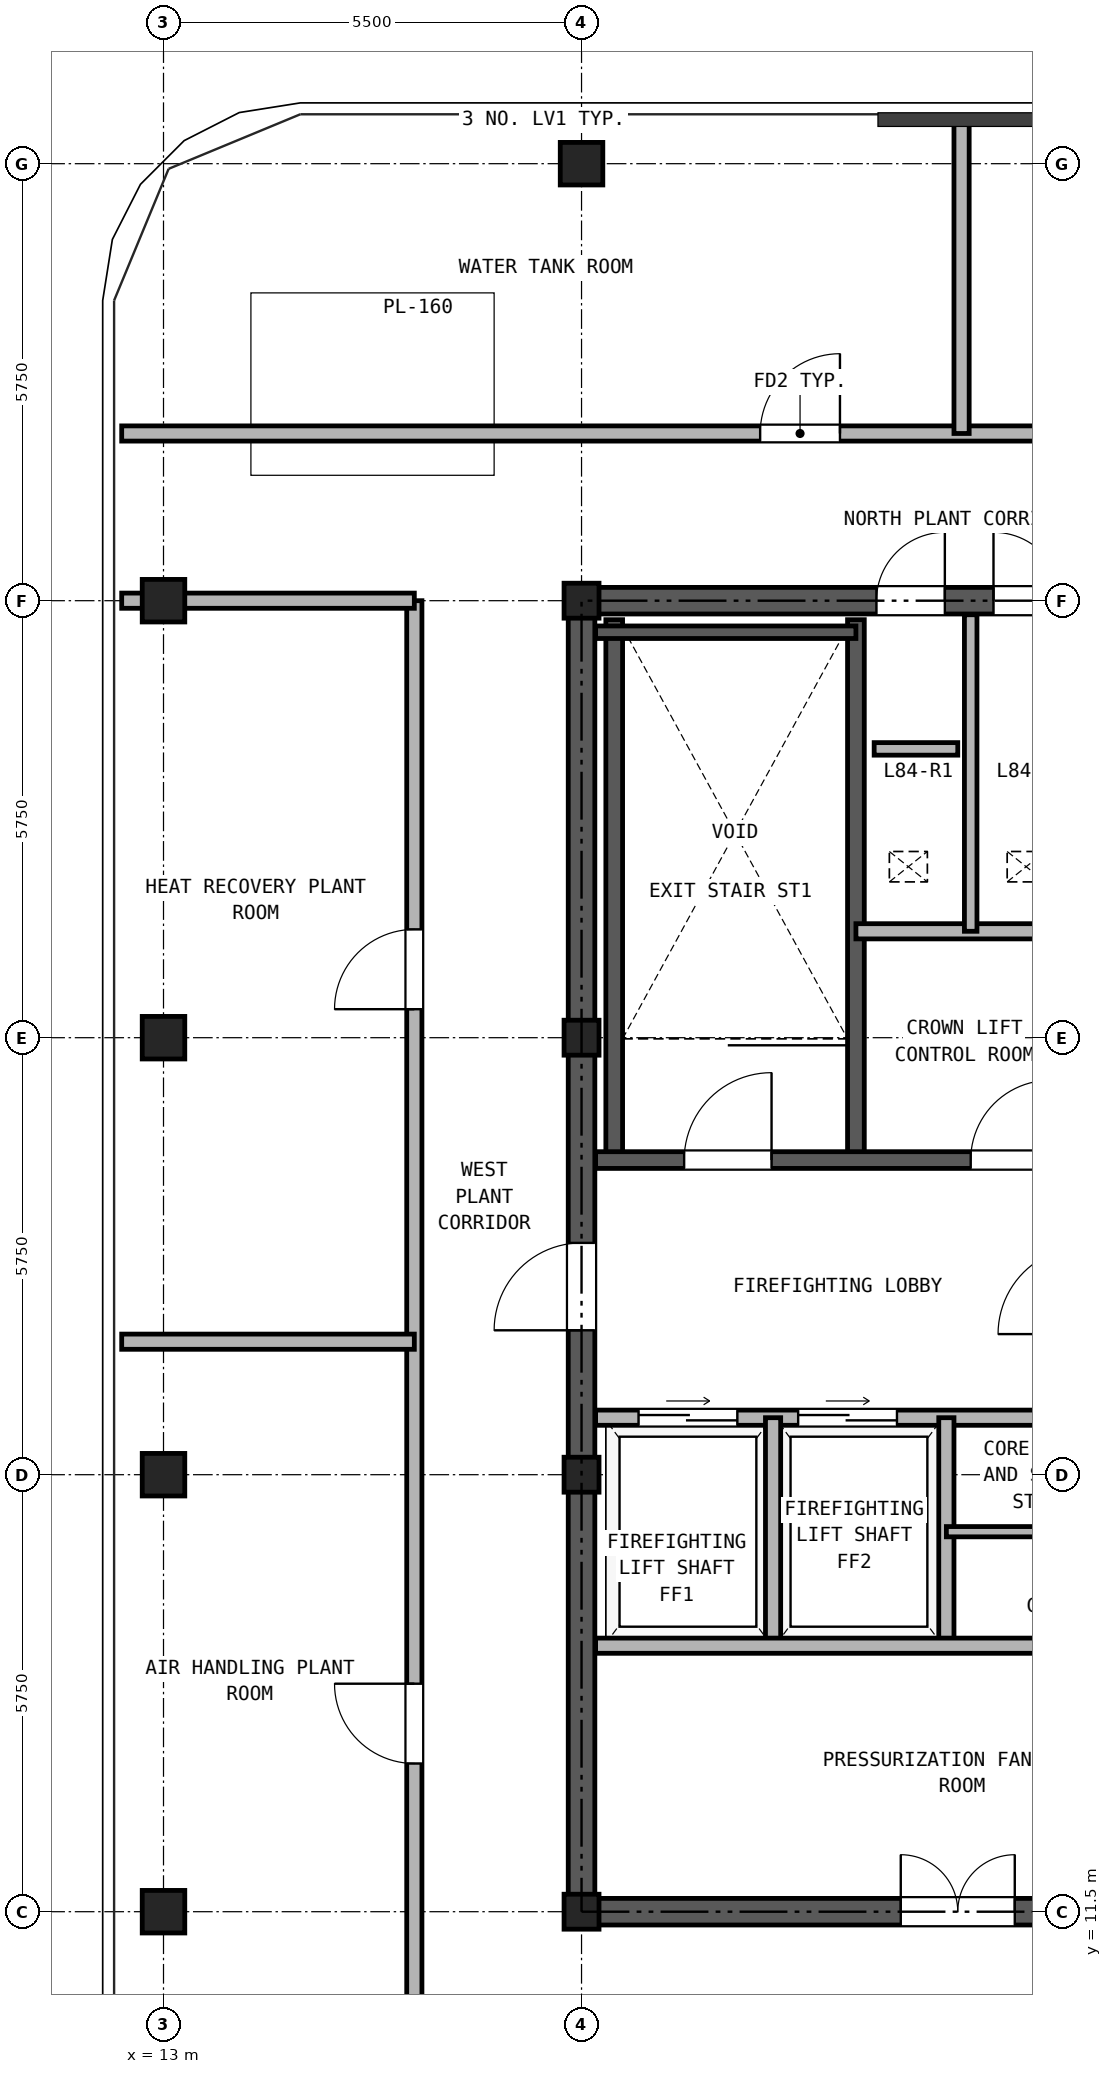
"""IFC4 building model, lengths in metres.
Left out: names, types, materials, properties, quantities, classifications, styles, units other than length and angle.
Written with IfcOpenShell. Run it as: python <this file> out.ifc"""

import sys

from ifc_helpers import new_model, si_unit, direction, frame, frame_2d, origin, origin_2d, place, context, subcontext, project, spatial, rectangle, hollow_rectangle, extrude, source, transform, mapped, element, fill, save


model = new_model("IFC4")
c1 = context("Model", 3, precision=1e-05, world=origin(), true_north=direction((0.0, 1.0)))
c2 = subcontext(c1, "Body", "Model", "MODEL_VIEW")
j1 = project(units=[si_unit("LENGTHUNIT", "METRE"), si_unit("PLANEANGLEUNIT", "RADIAN")], contexts=[c1])
p1 = place(None, origin())
s1 = spatial("IfcSite", under=j1, at=p1, CompositionType="ELEMENT")
p2 = place(p1, origin())
s2 = spatial("IfcBuilding", under=s1, at=p2, CompositionType="ELEMENT")
p3 = place(p2, frame((0.0, 0.0, 292.9)))
s3 = spatial("IfcBuildingStorey", under=s2, at=p3, CompositionType="ELEMENT", Elevation=292.9)
m1 = source(origin(), c2, "Body", "SweptSolid", [
    extrude(hollow_rectangle(XDim=0.56, YDim=0.56, WallThickness=0.03, at=origin_2d()), origin(), (0.0, 0.0, 1.0), 3.312),
])
for number, where, z_axis, x_axis in (
    (1, (18.5, 34.5, 0.0), (0.0, 0.0, 1.0), (1.0, 0.0, 0.0)),
    (2, (13.0, 11.5, 0.0), (0.0, 0.0, 1.0), (1.0, 0.0, 0.0)),
    (3, (13.0, 17.25, 0.0), (0.0, 0.0, 1.0), (1.0, 0.0, 0.0)),
    (4, (13.0, 23.0, 0.0), (0.0, 0.0, 1.0), (1.0, 0.0, 0.0)),
    (5, (13.0, 28.75, 0.0), (0.0, 0.0, 1.0), (1.0, 0.0, 0.0)),
):
    element("IfcColumn", number, at=place(p3, frame(where, z_axis=z_axis, x_axis=x_axis)), inside=s3, PredefinedType="COLUMN", context=c2, shape_type="MappedRepresentation", body=[
        mapped(m1, transform((0.0, 0.0, 0.0), x_axis=(1.0, 0.0, 0.0), y_axis=(0.0, 1.0, 0.0), z_axis=(0.0, 0.0, 1.0), scale=1.0)),
    ])
m2 = source(origin(), c2, "Body", "SweptSolid", [
    extrude(hollow_rectangle(XDim=0.46, YDim=0.46, WallThickness=0.025, at=origin_2d()), origin(), (0.0, 0.0, 1.0), 3.312),
])
for number, where, z_axis, x_axis in (
    (6, (18.5, 11.5, 0.0), (0.0, 0.0, 1.0), (1.0, 0.0, 0.0)),
    (7, (18.5, 17.25, 0.0), (0.0, 0.0, 1.0), (1.0, 0.0, 0.0)),
    (8, (18.5, 23.0, 0.0), (0.0, 0.0, 1.0), (1.0, 0.0, 0.0)),
    (9, (18.5, 28.75, 0.0), (0.0, 0.0, 1.0), (1.0, 0.0, 0.0)),
):
    element("IfcColumn", number, at=place(p3, frame(where, z_axis=z_axis, x_axis=x_axis)), inside=s3, PredefinedType="COLUMN", context=c2, shape_type="MappedRepresentation", body=[
        mapped(m2, transform((0.0, 0.0, 0.0), x_axis=(1.0, 0.0, 0.0), y_axis=(0.0, 1.0, 0.0), z_axis=(0.0, 0.0, 1.0), scale=1.0)),
    ])
p4 = place(p3, frame((18.325, 11.5, 0.0), z_axis=(0.0, 0.0, 1.0), x_axis=(1.0, 0.0, 0.0)))
e10 = element("IfcWall", 10, at=p4, inside=s3, PredefinedType="SHEAR", context=c2, shape_type="SweptSolid", body=[
    extrude(rectangle(XDim=10.35, YDim=0.35, at=frame_2d((5.175, 0.0))), origin(), (0.0, 0.0, 1.0), 3.34),
])
p5 = place(p4, frame((4.375, 0.0, 0.0)))
e11 = element("IfcOpeningElement", 11, at=p5, cuts=e10, PredefinedType="OPENING", context=c2, shape_type="SweptSolid", body=[
    extrude(rectangle(XDim=1.5, YDim=2.25, at=frame_2d((0.75, 1.125))), frame((0.0, 0.185, 0.0), z_axis=(0.0, -1.0, 0.0), x_axis=(1.0, 0.0, 0.0)), (0.0, 0.0, 1.0), 0.37),
])
p6 = place(p3, frame((18.325, 28.75, 0.0), z_axis=(0.0, 0.0, 1.0), x_axis=(1.0, 0.0, 0.0)))
e12 = element("IfcWall", 12, at=p6, inside=s3, PredefinedType="SHEAR", context=c2, shape_type="SweptSolid", body=[
    extrude(rectangle(XDim=10.35, YDim=0.35, at=frame_2d((5.175, 0.0))), origin(), (0.0, 0.0, 1.0), 3.34),
])
p7 = place(p6, frame((4.055, 0.0, 0.0)))
e13 = element("IfcOpeningElement", 13, at=p7, cuts=e12, PredefinedType="OPENING", context=c2, shape_type="SweptSolid", body=[
    extrude(rectangle(XDim=0.9, YDim=2.05, at=frame_2d((0.45, 1.025))), frame((0.0, 0.185, 0.0), z_axis=(0.0, -1.0, 0.0), x_axis=(1.0, 0.0, 0.0)), (0.0, 0.0, 1.0), 0.37),
])
p8 = place(p6, frame((5.595, 0.0, 0.0)))
e14 = element("IfcOpeningElement", 14, at=p8, cuts=e12, PredefinedType="OPENING", context=c2, shape_type="SweptSolid", body=[
    extrude(rectangle(XDim=0.9, YDim=2.05, at=frame_2d((0.45, 1.025))), frame((0.0, 0.185, 0.0), z_axis=(0.0, -1.0, 0.0), x_axis=(1.0, 0.0, 0.0)), (0.0, 0.0, 1.0), 0.37),
])
p9 = place(p3, frame((18.5, 11.675, 0.0), z_axis=(0.0, 0.0, 1.0), x_axis=(0.0, 1.0, 0.0)))
e15 = element("IfcWall", 15, at=p9, inside=s3, PredefinedType="SHEAR", context=c2, shape_type="SweptSolid", body=[
    extrude(rectangle(XDim=16.9, YDim=0.35, at=frame_2d((8.45, 0.0))), origin(), (0.0, 0.0, 1.0), 3.34),
])
p10 = place(p9, frame((7.475, 0.0, 0.0)))
e16 = element("IfcOpeningElement", 16, at=p10, cuts=e15, PredefinedType="OPENING", context=c2, shape_type="SweptSolid", body=[
    extrude(rectangle(XDim=1.15, YDim=2.2, at=frame_2d((0.575, 1.1))), frame((0.0, 0.185, 0.0), z_axis=(0.0, -1.0, 0.0), x_axis=(1.0, 0.0, 0.0)), (0.0, 0.0, 1.0), 0.37),
])
for number, where, z_axis, x_axis in (
    (17, (18.93, 21.39, 0.0), (0.0, 0.0, 1.0), (0.0, 1.0, 0.0)),
    (18, (22.11, 21.39, 0.0), (0.0, 0.0, 1.0), (0.0, 1.0, 0.0)),
):
    element("IfcWall", number, at=place(p3, frame(where, z_axis=z_axis, x_axis=x_axis)), inside=s3, PredefinedType="SOLIDWALL", context=c2, shape_type="SweptSolid", body=[
        extrude(rectangle(XDim=7.11, YDim=0.22, at=frame_2d((3.555, 0.0))), origin(), (0.0, 0.0, 1.0), 3.34),
    ])
p11 = place(p3, frame((18.685, 28.335, 0.0), z_axis=(0.0, 0.0, 1.0), x_axis=(1.0, 0.0, 0.0)))
e19 = element("IfcWall", 19, at=p11, inside=s3, PredefinedType="PARTITIONING", context=c2, shape_type="SweptSolid", body=[
    extrude(rectangle(XDim=3.425, YDim=0.165, at=frame_2d((1.712, 0.0))), origin(), (0.0, 0.0, 1.0), 3.34),
])
p12 = place(p3, frame((18.685, 21.39, 0.0), z_axis=(0.0, 0.0, 1.0), x_axis=(1.0, 0.0, 0.0)))
e20 = element("IfcWall", 20, at=p12, inside=s3, PredefinedType="SOLIDWALL", context=c2, shape_type="SweptSolid", body=[
    extrude(rectangle(XDim=6.445, YDim=0.22, at=frame_2d((3.222, 0.0))), origin(), (0.0, 0.0, 1.0), 3.34),
])
p13 = place(p12, frame((1.165, 0.0, 0.0)))
e21 = element("IfcOpeningElement", 21, at=p13, cuts=e20, PredefinedType="OPENING", context=c2, shape_type="SweptSolid", body=[
    extrude(rectangle(XDim=1.15, YDim=2.2, at=frame_2d((0.575, 1.1))), frame((0.0, 0.12, 0.0), z_axis=(0.0, -1.0, 0.0), x_axis=(1.0, 0.0, 0.0)), (0.0, 0.0, 1.0), 0.24),
])
p14 = place(p12, frame((4.935, 0.0, 0.0)))
e22 = element("IfcOpeningElement", 22, at=p14, cuts=e20, PredefinedType="OPENING", context=c2, shape_type="SweptSolid", body=[
    extrude(rectangle(XDim=1.05, YDim=2.15, at=frame_2d((0.525, 1.075))), frame((0.0, 0.12, 0.0), z_axis=(0.0, -1.0, 0.0), x_axis=(1.0, 0.0, 0.0)), (0.0, 0.0, 1.0), 0.24),
])
p15 = place(p3, frame((22.11, 24.4, 0.0), z_axis=(0.0, 0.0, 1.0), x_axis=(1.0, 0.0, 0.0)))
e23 = element("IfcWall", 23, at=p15, inside=s3, PredefinedType="PARTITIONING", context=c2, shape_type="SweptSolid", body=[
    extrude(rectangle(XDim=3.02, YDim=0.2, at=frame_2d((1.51, 0.0))), origin(), (0.0, 0.0, 1.0), 3.34),
])
p16 = place(p3, frame((23.62, 24.4, 0.0), z_axis=(0.0, 0.0, 1.0), x_axis=(0.0, 1.0, 0.0)))
e24 = element("IfcWall", 24, at=p16, inside=s3, PredefinedType="PARTITIONING", context=c2, shape_type="SweptSolid", body=[
    extrude(rectangle(XDim=4.165, YDim=0.165, at=frame_2d((2.083, 0.0))), origin(), (0.0, 0.0, 1.0), 3.34),
])
p17 = place(p3, frame((18.685, 18.0, 0.0), z_axis=(0.0, 0.0, 1.0), x_axis=(1.0, 0.0, 0.0)))
e25 = element("IfcWall", 25, at=p17, inside=s3, PredefinedType="PARTITIONING", context=c2, shape_type="SweptSolid", body=[
    extrude(rectangle(XDim=9.63, YDim=0.2, at=frame_2d((4.815, 0.0))), origin(), (0.0, 0.0, 1.0), 3.34),
])
p18 = place(p17, frame((0.565, 0.0, 0.0)))
e26 = element("IfcOpeningElement", 26, at=p18, cuts=e25, PredefinedType="OPENING", context=c2, shape_type="SweptSolid", body=[
    extrude(rectangle(XDim=1.3, YDim=2.3, at=frame_2d((0.65, 1.15))), frame((0.0, 0.11, 0.0), z_axis=(0.0, -1.0, 0.0), x_axis=(1.0, 0.0, 0.0)), (0.0, 0.0, 1.0), 0.22),
])
p19 = place(p17, frame((2.665, 0.0, 0.0)))
e27 = element("IfcOpeningElement", 27, at=p19, cuts=e25, PredefinedType="OPENING", context=c2, shape_type="SweptSolid", body=[
    extrude(rectangle(XDim=1.3, YDim=2.3, at=frame_2d((0.65, 1.15))), frame((0.0, 0.11, 0.0), z_axis=(0.0, -1.0, 0.0), x_axis=(1.0, 0.0, 0.0)), (0.0, 0.0, 1.0), 0.22),
])
p20 = place(p17, frame((7.165, 0.0, 0.0)))
e28 = element("IfcOpeningElement", 28, at=p20, cuts=e25, PredefinedType="OPENING", context=c2, shape_type="SweptSolid", body=[
    extrude(rectangle(XDim=1.0, YDim=2.15, at=frame_2d((0.5, 1.075))), frame((0.0, 0.11, 0.0), z_axis=(0.0, -1.0, 0.0), x_axis=(1.0, 0.0, 0.0)), (0.0, 0.0, 1.0), 0.22),
])
for number, where, z_axis, x_axis in (
    (29, (21.02, 15.0, 0.0), (0.0, 0.0, 1.0), (0.0, 1.0, 0.0)),
    (30, (23.3, 15.0, 0.0), (0.0, 0.0, 1.0), (0.0, 1.0, 0.0)),
):
    element("IfcWall", number, at=place(p3, frame(where, z_axis=z_axis, x_axis=x_axis)), inside=s3, PredefinedType="PARTITIONING", context=c2, shape_type="SweptSolid", body=[
        extrude(rectangle(XDim=3.0, YDim=0.2, at=frame_2d((1.5, 0.0))), origin(), (0.0, 0.0, 1.0), 3.34),
    ])
p21 = place(p3, frame((18.685, 15.0, 0.0), z_axis=(0.0, 0.0, 1.0), x_axis=(1.0, 0.0, 0.0)))
e31 = element("IfcWall", 31, at=p21, inside=s3, PredefinedType="PARTITIONING", context=c2, shape_type="SweptSolid", body=[
    extrude(rectangle(XDim=9.63, YDim=0.2, at=frame_2d((4.815, 0.0))), origin(), (0.0, 0.0, 1.0), 3.34),
])
p22 = place(p3, frame((23.3, 16.5, 0.0), z_axis=(0.0, 0.0, 1.0), x_axis=(1.0, 0.0, 0.0)))
e32 = element("IfcWall", 32, at=p22, inside=s3, PredefinedType="PARTITIONING", context=c2, shape_type="SweptSolid", body=[
    extrude(rectangle(XDim=5.015, YDim=0.135, at=frame_2d((2.507, 0.0))), origin(), (0.0, 0.0, 1.0), 3.34),
])
p23 = place(p22, frame((2.55, 0.0, 0.0)))
e33 = element("IfcOpeningElement", 33, at=p23, cuts=e32, PredefinedType="OPENING", context=c2, shape_type="SweptSolid", body=[
    extrude(rectangle(XDim=0.9, YDim=2.05, at=frame_2d((0.45, 1.025))), frame((0.0, 0.077, 0.0), z_axis=(0.0, -1.0, 0.0), x_axis=(1.0, 0.0, 0.0)), (0.0, 0.0, 1.0), 0.155),
])
p24 = place(p3, frame((12.45, 30.95, 0.0), z_axis=(0.0, 0.0, 1.0), x_axis=(1.0, 0.0, 0.0)))
e34 = element("IfcWall", 34, at=p24, inside=s3, PredefinedType="PARTITIONING", context=c2, shape_type="SweptSolid", body=[
    extrude(rectangle(XDim=22.1, YDim=0.2, at=frame_2d((11.05, 0.0))), origin(), (0.0, 0.0, 1.0), 3.34),
])
p25 = place(p24, frame((8.4, 0.0, 0.0)))
e35 = element("IfcOpeningElement", 35, at=p25, cuts=e34, PredefinedType="OPENING", context=c2, shape_type="SweptSolid", body=[
    extrude(rectangle(XDim=1.05, YDim=2.15, at=frame_2d((0.525, 1.075))), frame((0.0, 0.11, 0.0), z_axis=(0.0, -1.0, 0.0), x_axis=(1.0, 0.0, 0.0)), (0.0, 0.0, 1.0), 0.22),
])
p26 = place(p24, frame((12.7, 0.0, 0.0)))
e36 = element("IfcOpeningElement", 36, at=p26, cuts=e34, PredefinedType="OPENING", context=c2, shape_type="SweptSolid", body=[
    extrude(rectangle(XDim=1.05, YDim=2.15, at=frame_2d((0.525, 1.075))), frame((0.0, 0.11, 0.0), z_axis=(0.0, -1.0, 0.0), x_axis=(1.0, 0.0, 0.0)), (0.0, 0.0, 1.0), 0.22),
])
p27 = place(p3, frame((16.3, 8.9, 0.0), z_axis=(0.0, 0.0, 1.0), x_axis=(0.0, 1.0, 0.0)))
e37 = element("IfcWall", 37, at=p27, inside=s3, PredefinedType="PARTITIONING", context=c2, shape_type="SweptSolid", body=[
    extrude(rectangle(XDim=19.85, YDim=0.2, at=frame_2d((9.925, 0.0))), origin(), (0.0, 0.0, 1.0), 3.34),
])
p28 = place(p27, frame((4.55, 0.0, 0.0)))
e38 = element("IfcOpeningElement", 38, at=p28, cuts=e37, PredefinedType="OPENING", context=c2, shape_type="SweptSolid", body=[
    extrude(rectangle(XDim=1.05, YDim=2.15, at=frame_2d((0.525, 1.075))), frame((0.0, 0.11, 0.0), z_axis=(0.0, -1.0, 0.0), x_axis=(1.0, 0.0, 0.0)), (0.0, 0.0, 1.0), 0.22),
])
p29 = place(p27, frame((14.475, 0.0, 0.0)))
e39 = element("IfcOpeningElement", 39, at=p29, cuts=e37, PredefinedType="OPENING", context=c2, shape_type="SweptSolid", body=[
    extrude(rectangle(XDim=1.05, YDim=2.15, at=frame_2d((0.525, 1.075))), frame((0.0, 0.11, 0.0), z_axis=(0.0, -1.0, 0.0), x_axis=(1.0, 0.0, 0.0)), (0.0, 0.0, 1.0), 0.22),
])
p30 = place(p3, frame((12.45, 28.75, 0.0), z_axis=(0.0, 0.0, 1.0), x_axis=(1.0, 0.0, 0.0)))
e40 = element("IfcWall", 40, at=p30, inside=s3, PredefinedType="PARTITIONING", context=c2, shape_type="SweptSolid", body=[
    extrude(rectangle(XDim=3.85, YDim=0.2, at=frame_2d((1.925, 0.0))), origin(), (0.0, 0.0, 1.0), 2.865),
])
p31 = place(p3, frame((23.5, 30.95, 0.0), z_axis=(0.0, 0.0, 1.0), x_axis=(0.0, 1.0, 0.0)))
e41 = element("IfcWall", 41, at=p31, inside=s3, PredefinedType="PARTITIONING", context=c2, shape_type="SweptSolid", body=[
    extrude(rectangle(XDim=4.1, YDim=0.2, at=frame_2d((2.05, 0.0))), origin(), (0.0, 0.0, 1.0), 3.34),
])
p32 = place(p3, frame((12.45, 19.0, 0.0), z_axis=(0.0, 0.0, 1.0), x_axis=(1.0, 0.0, 0.0)))
e42 = element("IfcWall", 42, at=p32, inside=s3, PredefinedType="PARTITIONING", context=c2, shape_type="SweptSolid", body=[
    extrude(rectangle(XDim=3.85, YDim=0.2, at=frame_2d((1.925, 0.0))), origin(), (0.0, 0.0, 1.0), 3.34),
])
p33 = place(p3, frame((22.35, 26.8, 0.0), z_axis=(0.0, 0.0, 1.0), x_axis=(1.0, 0.0, 0.0)))
e43 = element("IfcWall", 43, at=p33, inside=s3, PredefinedType="PARTITIONING", context=c2, shape_type="SweptSolid", body=[
    extrude(rectangle(XDim=1.1, YDim=0.165, at=frame_2d((0.55, 0.0))), origin(), (0.0, 0.0, 1.0), 3.34),
])
p34 = place(p13, frame((1.15, 0.0, 0.0), z_axis=(0.0, 0.0, 1.0), x_axis=(-1.0, 0.0, 0.0)))
e44 = element("IfcDoor", 44, at=p34, inside=s3, OperationType="SINGLE_SWING_RIGHT", PredefinedType="DOOR", context=c2, shape_type="SweptSolid", body=[
    extrude(rectangle(XDim=1.15, YDim=2.2, at=frame_2d((0.575, 1.1))), frame((0.0, 0.025, 0.0), z_axis=(0.0, -1.0, 0.0), x_axis=(1.0, 0.0, 0.0)), (0.0, 0.0, 1.0), 0.05),
])
fill(e21, e44)
p35 = place(p14, origin())
e45 = element("IfcDoor", 45, at=p35, inside=s3, OperationType="SINGLE_SWING_RIGHT", PredefinedType="DOOR", context=c2, shape_type="SweptSolid", body=[
    extrude(rectangle(XDim=1.05, YDim=2.15, at=frame_2d((0.525, 1.075))), frame((0.0, 0.025, 0.0), z_axis=(0.0, -1.0, 0.0), x_axis=(1.0, 0.0, 0.0)), (0.0, 0.0, 1.0), 0.05),
])
fill(e22, e45)
p36 = place(p18, origin())
e46 = element("IfcDoor", 46, at=p36, inside=s3, OperationType="DOUBLE_DOOR_SLIDING", PredefinedType="DOOR", context=c2, shape_type="SweptSolid", body=[
    extrude(rectangle(XDim=1.3, YDim=2.3, at=frame_2d((0.65, 1.15))), frame((0.0, 0.025, 0.0), z_axis=(0.0, -1.0, 0.0), x_axis=(1.0, 0.0, 0.0)), (0.0, 0.0, 1.0), 0.05),
])
fill(e26, e46)
p37 = place(p19, origin())
e47 = element("IfcDoor", 47, at=p37, inside=s3, OperationType="DOUBLE_DOOR_SLIDING", PredefinedType="DOOR", context=c2, shape_type="SweptSolid", body=[
    extrude(rectangle(XDim=1.3, YDim=2.3, at=frame_2d((0.65, 1.15))), frame((0.0, 0.025, 0.0), z_axis=(0.0, -1.0, 0.0), x_axis=(1.0, 0.0, 0.0)), (0.0, 0.0, 1.0), 0.05),
])
fill(e27, e47)
p38 = place(p10, frame((1.15, 0.0, 0.0), z_axis=(0.0, 0.0, 1.0), x_axis=(-1.0, 0.0, 0.0)))
e48 = element("IfcDoor", 48, at=p38, inside=s3, OperationType="SINGLE_SWING_LEFT", PredefinedType="DOOR", context=c2, shape_type="SweptSolid", body=[
    extrude(rectangle(XDim=1.15, YDim=2.2, at=frame_2d((0.575, 1.1))), frame((0.0, 0.025, 0.0), z_axis=(0.0, -1.0, 0.0), x_axis=(1.0, 0.0, 0.0)), (0.0, 0.0, 1.0), 0.05),
])
fill(e16, e48)
p39 = place(p7, origin())
e49 = element("IfcDoor", 49, at=p39, inside=s3, OperationType="SINGLE_SWING_RIGHT", PredefinedType="DOOR", context=c2, shape_type="SweptSolid", body=[
    extrude(rectangle(XDim=0.9, YDim=2.05, at=frame_2d((0.45, 1.025))), frame((0.0, 0.025, 0.0), z_axis=(0.0, -1.0, 0.0), x_axis=(1.0, 0.0, 0.0)), (0.0, 0.0, 1.0), 0.05),
])
fill(e13, e49)
p40 = place(p8, origin())
e50 = element("IfcDoor", 50, at=p40, inside=s3, OperationType="SINGLE_SWING_LEFT", PredefinedType="DOOR", context=c2, shape_type="SweptSolid", body=[
    extrude(rectangle(XDim=0.9, YDim=2.05, at=frame_2d((0.45, 1.025))), frame((0.0, 0.025, 0.0), z_axis=(0.0, -1.0, 0.0), x_axis=(1.0, 0.0, 0.0)), (0.0, 0.0, 1.0), 0.05),
])
fill(e14, e50)
p41 = place(p5, frame((1.5, 0.0, 0.0), z_axis=(0.0, 0.0, 1.0), x_axis=(-1.0, 0.0, 0.0)))
e51 = element("IfcDoor", 51, at=p41, inside=s3, OperationType="DOUBLE_DOOR_SINGLE_SWING", PredefinedType="DOOR", context=c2, shape_type="SweptSolid", body=[
    extrude(rectangle(XDim=1.5, YDim=2.25, at=frame_2d((0.75, 1.125))), frame((0.0, 0.025, 0.0), z_axis=(0.0, -1.0, 0.0), x_axis=(1.0, 0.0, 0.0)), (0.0, 0.0, 1.0), 0.05),
])
fill(e11, e51)
p42 = place(p25, origin())
e52 = element("IfcDoor", 52, at=p42, inside=s3, OperationType="SINGLE_SWING_RIGHT", PredefinedType="DOOR", context=c2, shape_type="SweptSolid", body=[
    extrude(rectangle(XDim=1.05, YDim=2.15, at=frame_2d((0.525, 1.075))), frame((0.0, 0.025, 0.0), z_axis=(0.0, -1.0, 0.0), x_axis=(1.0, 0.0, 0.0)), (0.0, 0.0, 1.0), 0.05),
])
fill(e35, e52)
p43 = place(p28, frame((1.05, 0.0, 0.0), z_axis=(0.0, 0.0, 1.0), x_axis=(-1.0, 0.0, 0.0)))
e53 = element("IfcDoor", 53, at=p43, inside=s3, OperationType="SINGLE_SWING_RIGHT", PredefinedType="DOOR", context=c2, shape_type="SweptSolid", body=[
    extrude(rectangle(XDim=1.05, YDim=2.15, at=frame_2d((0.525, 1.075))), frame((0.0, 0.025, 0.0), z_axis=(0.0, -1.0, 0.0), x_axis=(1.0, 0.0, 0.0)), (0.0, 0.0, 1.0), 0.05),
])
fill(e38, e53)
p44 = place(p29, frame((1.05, 0.0, 0.0), z_axis=(0.0, 0.0, 1.0), x_axis=(-1.0, 0.0, 0.0)))
e54 = element("IfcDoor", 54, at=p44, inside=s3, OperationType="SINGLE_SWING_LEFT", PredefinedType="DOOR", context=c2, shape_type="SweptSolid", body=[
    extrude(rectangle(XDim=1.05, YDim=2.15, at=frame_2d((0.525, 1.075))), frame((0.0, 0.025, 0.0), z_axis=(0.0, -1.0, 0.0), x_axis=(1.0, 0.0, 0.0)), (0.0, 0.0, 1.0), 0.05),
])
fill(e39, e54)
save(model, sys.argv[1])
